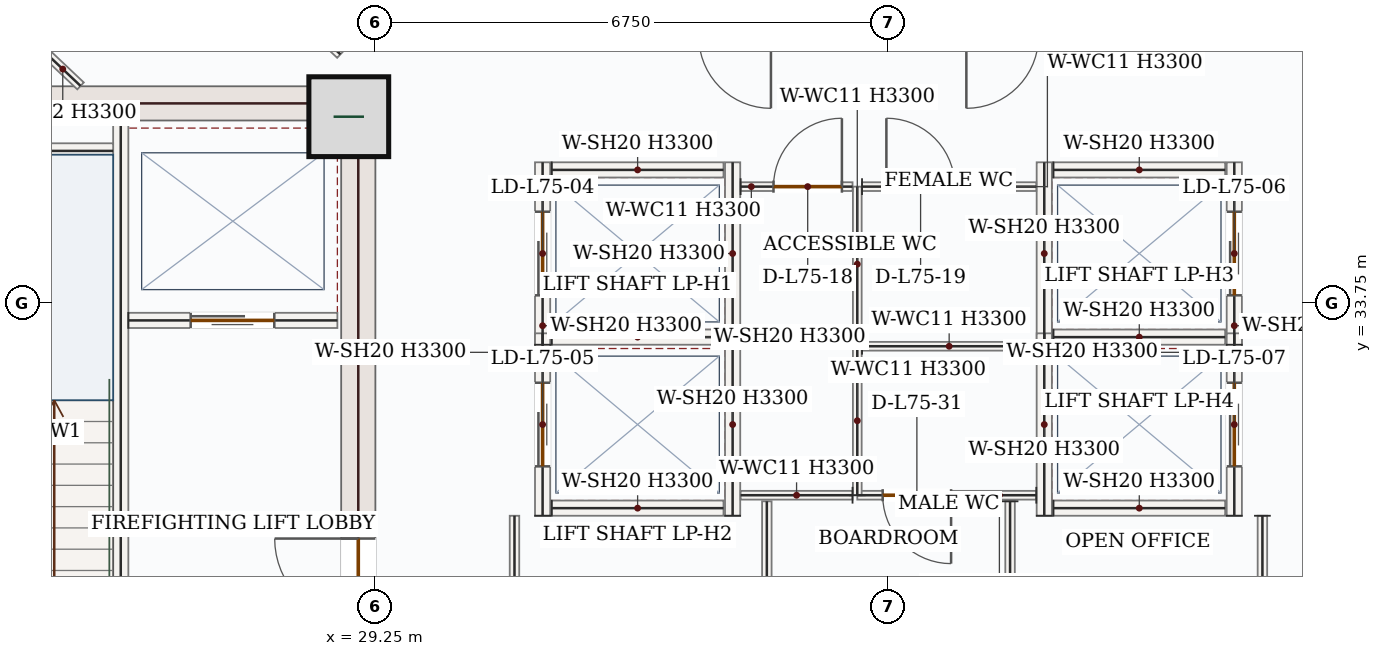
"""IFC4 building model, lengths in metres.
Left out: names, types, materials, properties, quantities, classifications, styles, units other than length and angle.
Written with IfcOpenShell. Run it as: python <this file> out.ifc"""

import sys

from ifc_helpers import new_model, si_unit, direction, frame, frame_2d, origin, origin_2d, place, context, subcontext, project, spatial, rectangle, extrude, source, transform, mapped, element, fill, save


model = new_model("IFC4")
c1 = context("Model", 3, precision=1e-05, world=origin(), true_north=direction((0.0, 1.0)))
c2 = subcontext(c1, "Body", "Model", "MODEL_VIEW")
j1 = project(units=[si_unit("LENGTHUNIT", "METRE"), si_unit("PLANEANGLEUNIT", "RADIAN")], contexts=[c1])
p1 = place(None, origin())
s1 = spatial("IfcSite", under=j1, at=p1, CompositionType="ELEMENT")
p2 = place(p1, origin())
s2 = spatial("IfcBuilding", under=s1, at=p2, CompositionType="ELEMENT")
p3 = place(p2, frame((0.0, 0.0, 310.35)))
s3 = spatial("IfcBuildingStorey", under=s2, at=p3, CompositionType="ELEMENT", Elevation=310.35)
p4 = place(p3, frame((29.025, 28.05, 0.0), z_axis=(0.0, 0.0, 1.0), x_axis=(0.0, 1.0, 0.0)))
e1 = element("IfcWall", 1, at=p4, inside=s3, PredefinedType="SHEAR", context=c2, shape_type="SweptSolid", body=[
    extrude(rectangle(XDim=8.55, YDim=0.45, at=frame_2d((4.275, 0.0))), origin(), (0.0, 0.0, 1.0), 3.3),
])
p5 = place(p4, frame((1.5, 0.0, 0.0)))
e2 = element("IfcOpeningElement", 2, at=p5, cuts=e1, PredefinedType="OPENING", context=c2, shape_type="SweptSolid", body=[
    extrude(rectangle(XDim=1.1, YDim=2.2, at=frame_2d((0.55, 1.1))), frame((0.0, 0.235, 0.0), z_axis=(0.0, -1.0, 0.0), x_axis=(1.0, 0.0, 0.0)), (0.0, 0.0, 1.0), 0.47),
])
m1 = source(origin(), c2, "Body", "SweptSolid", [
    extrude(rectangle(XDim=7.1, YDim=0.45, at=frame_2d((3.55, 0.0))), origin(), (0.0, 0.0, 1.0), 3.3),
])
p6 = place(p3, frame((21.7, 36.375, 0.0), z_axis=(0.0, 0.0, 1.0), x_axis=(1.0, 0.0, 0.0)))
e3 = element("IfcWall", 3, at=p6, inside=s3, PredefinedType="SHEAR", context=c2, shape_type="MappedRepresentation", body=[
    mapped(m1, transform((0.0, 0.0, 0.0), x_axis=(1.0, 0.0, 0.0), y_axis=(0.0, 1.0, 0.0), z_axis=(0.0, 0.0, 1.0), scale=1.0)),
])
m2 = source(origin(), c2, "Body", "SweptSolid", [
    extrude(rectangle(XDim=1.05, YDim=1.05, at=origin_2d()), origin(), (0.0, 0.0, 1.0), 3.75),
])
p7 = place(p3, frame((28.9, 36.2, 0.0), z_axis=(0.0, 0.0, 1.0), x_axis=(1.0, 0.0, 0.0)))
e4 = element("IfcColumn", 4, at=p7, inside=s3, PredefinedType="COLUMN", context=c2, shape_type="MappedRepresentation", body=[
    mapped(m2, transform((0.0, 0.0, 0.0), x_axis=(1.0, 0.0, 0.0), y_axis=(0.0, 1.0, 0.0), z_axis=(0.0, 0.0, 1.0), scale=1.0)),
])
m3 = source(origin(), c2, "Body", "SweptSolid", [
    extrude(rectangle(XDim=10.47, YDim=0.28, at=frame_2d((5.235, 0.0))), origin(), (0.0, 0.0, 1.0), 3.3),
])
p8 = place(p3, frame((18.94, 35.542, 0.0), z_axis=(0.0, 0.0, 1.0), x_axis=(0.690070788875, 0.723741878256, 0.0)))
e5 = element("IfcWall", 5, at=p8, inside=s3, PredefinedType="SOLIDWALL", context=c2, shape_type="MappedRepresentation", body=[
    mapped(m3, transform((0.0, 0.0, 0.0), x_axis=(1.0, 0.0, 0.0), y_axis=(0.0, 1.0, 0.0), z_axis=(0.0, 0.0, 1.0), scale=1.0)),
])
p9 = place(p3, frame((25.9, 28.15, 0.0), z_axis=(0.0, 0.0, 1.0), x_axis=(0.0, 1.0, 0.0)))
e6 = element("IfcWall", 6, at=p9, inside=s3, PredefinedType="SOLIDWALL", context=c2, shape_type="SweptSolid", body=[
    extrude(rectangle(XDim=8.0, YDim=0.2, at=frame_2d((4.0, 0.0))), origin(), (0.0, 0.0, 1.0), 3.3),
])
p10 = place(p9, frame((0.4, 0.0, 0.0)))
e7 = element("IfcOpeningElement", 7, at=p10, cuts=e6, PredefinedType="OPENING", context=c2, shape_type="SweptSolid", body=[
    extrude(rectangle(XDim=1.05, YDim=2.15, at=frame_2d((0.525, 1.075))), frame((0.0, 0.11, 0.0), z_axis=(0.0, -1.0, 0.0), x_axis=(1.0, 0.0, 0.0)), (0.0, 0.0, 1.0), 0.22),
])
m4 = source(origin(), c2, "Body", "SweptSolid", [
    extrude(rectangle(XDim=3.25, YDim=0.2, at=frame_2d((1.625, 0.0))), origin(), (0.0, 0.0, 1.0), 3.3),
])
p11 = place(p3, frame((22.55, 35.75, 0.0), z_axis=(0.0, 0.0, 1.0), x_axis=(1.0, 0.0, 0.0)))
e8 = element("IfcWall", 8, at=p11, inside=s3, PredefinedType="SOLIDWALL", context=c2, shape_type="MappedRepresentation", body=[
    mapped(m4, transform((0.0, 0.0, 0.0), x_axis=(1.0, 0.0, 0.0), y_axis=(0.0, 1.0, 0.0), z_axis=(0.0, 0.0, 1.0), scale=1.0)),
])
p12 = place(p3, frame((26.0, 33.52, 0.0), z_axis=(0.0, 0.0, 1.0), x_axis=(1.0, 0.0, 0.0)))
e9 = element("IfcWall", 9, at=p12, inside=s3, PredefinedType="SOLIDWALL", context=c2, shape_type="SweptSolid", body=[
    extrude(rectangle(XDim=2.75, YDim=0.2, at=frame_2d((1.375, 0.0))), origin(), (0.0, 0.0, 1.0), 3.3),
])
p13 = place(p12, frame((0.82, 0.0, 0.0)))
e10 = element("IfcOpeningElement", 10, at=p13, cuts=e9, PredefinedType="OPENING", context=c2, shape_type="SweptSolid", body=[
    extrude(rectangle(XDim=1.1, YDim=2.15, at=frame_2d((0.55, 1.075))), frame((0.0, 0.11, 0.0), z_axis=(0.0, -1.0, 0.0), x_axis=(1.0, 0.0, 0.0)), (0.0, 0.0, 1.0), 0.22),
])
p14 = place(p3, frame((31.45, 33.2, 0.0), z_axis=(0.0, 0.0, 1.0), x_axis=(0.0, 1.0, 0.0)))
e11 = element("IfcWall", 11, at=p14, inside=s3, PredefinedType="SOLIDWALL", context=c2, shape_type="SweptSolid", body=[
    extrude(rectangle(XDim=2.4, YDim=0.2, at=frame_2d((1.2, 0.0))), origin(), (0.0, 0.0, 1.0), 3.3),
])
p15 = place(p14, frame((0.65, 0.0, 0.0)))
e12 = element("IfcOpeningElement", 12, at=p15, cuts=e11, PredefinedType="OPENING", context=c2, shape_type="SweptSolid", body=[
    extrude(rectangle(XDim=1.1, YDim=2.15, at=frame_2d((0.55, 1.075))), frame((0.0, 0.11, 0.0), z_axis=(0.0, -1.0, 0.0), x_axis=(1.0, 0.0, 0.0)), (0.0, 0.0, 1.0), 0.22),
])
m5 = source(origin(), c2, "Body", "SweptSolid", [
    extrude(rectangle(XDim=2.4, YDim=0.2, at=frame_2d((1.2, 0.0))), origin(), (0.0, 0.0, 1.0), 3.3),
])
p16 = place(p3, frame((33.95, 33.2, 0.0), z_axis=(0.0, 0.0, 1.0), x_axis=(0.0, 1.0, 0.0)))
e13 = element("IfcWall", 13, at=p16, inside=s3, PredefinedType="SOLIDWALL", context=c2, shape_type="MappedRepresentation", body=[
    mapped(m5, transform((0.0, 0.0, 0.0), x_axis=(1.0, 0.0, 0.0), y_axis=(0.0, 1.0, 0.0), z_axis=(0.0, 0.0, 1.0), scale=1.0)),
])
m6 = source(origin(), c2, "Body", "SweptSolid", [
    extrude(rectangle(XDim=2.26, YDim=0.2, at=frame_2d((1.13, 0.0))), origin(), (0.0, 0.0, 1.0), 3.3),
])
for number, where, z_axis, x_axis in (
    (14, (31.57, 33.3, 0.0), (0.0, 0.0, 1.0), (1.0, 0.0, 0.0)),
    (15, (31.57, 35.5, 0.0), (0.0, 0.0, 1.0), (1.0, 0.0, 0.0)),
):
    element("IfcWall", number, at=place(p3, frame(where, z_axis=z_axis, x_axis=x_axis)), inside=s3, PredefinedType="SOLIDWALL", context=c2, shape_type="MappedRepresentation", body=[
        mapped(m6, transform((0.0, 0.0, 0.0), x_axis=(1.0, 0.0, 0.0), y_axis=(0.0, 1.0, 0.0), z_axis=(0.0, 0.0, 1.0), scale=1.0)),
    ])
p17 = place(p3, frame((31.45, 30.95, 0.0), z_axis=(0.0, 0.0, 1.0), x_axis=(0.0, 1.0, 0.0)))
e16 = element("IfcWall", 16, at=p17, inside=s3, PredefinedType="SOLIDWALL", context=c2, shape_type="SweptSolid", body=[
    extrude(rectangle(XDim=2.4, YDim=0.2, at=frame_2d((1.2, 0.0))), origin(), (0.0, 0.0, 1.0), 3.3),
])
p18 = place(p17, frame((0.65, 0.0, 0.0)))
e17 = element("IfcOpeningElement", 17, at=p18, cuts=e16, PredefinedType="OPENING", context=c2, shape_type="SweptSolid", body=[
    extrude(rectangle(XDim=1.1, YDim=2.15, at=frame_2d((0.55, 1.075))), frame((0.0, 0.11, 0.0), z_axis=(0.0, -1.0, 0.0), x_axis=(1.0, 0.0, 0.0)), (0.0, 0.0, 1.0), 0.22),
])
p19 = place(p3, frame((33.95, 30.95, 0.0), z_axis=(0.0, 0.0, 1.0), x_axis=(0.0, 1.0, 0.0)))
e18 = element("IfcWall", 18, at=p19, inside=s3, PredefinedType="SOLIDWALL", context=c2, shape_type="MappedRepresentation", body=[
    mapped(m5, transform((0.0, 0.0, 0.0), x_axis=(1.0, 0.0, 0.0), y_axis=(0.0, 1.0, 0.0), z_axis=(0.0, 0.0, 1.0), scale=1.0)),
])
p20 = place(p3, frame((31.57, 31.05, 0.0), z_axis=(0.0, 0.0, 1.0), x_axis=(1.0, 0.0, 0.0)))
e19 = element("IfcWall", 19, at=p20, inside=s3, PredefinedType="SOLIDWALL", context=c2, shape_type="MappedRepresentation", body=[
    mapped(m6, transform((0.0, 0.0, 0.0), x_axis=(1.0, 0.0, 0.0), y_axis=(0.0, 1.0, 0.0), z_axis=(0.0, 0.0, 1.0), scale=1.0)),
])
p21 = place(p3, frame((38.05, 33.2, 0.0), z_axis=(0.0, 0.0, 1.0), x_axis=(0.0, 1.0, 0.0)))
e20 = element("IfcWall", 20, at=p21, inside=s3, PredefinedType="SOLIDWALL", context=c2, shape_type="MappedRepresentation", body=[
    mapped(m5, transform((0.0, 0.0, 0.0), x_axis=(1.0, 0.0, 0.0), y_axis=(0.0, 1.0, 0.0), z_axis=(0.0, 0.0, 1.0), scale=1.0)),
])
p22 = place(p3, frame((40.55, 33.2, 0.0), z_axis=(0.0, 0.0, 1.0), x_axis=(0.0, 1.0, 0.0)))
e21 = element("IfcWall", 21, at=p22, inside=s3, PredefinedType="SOLIDWALL", context=c2, shape_type="SweptSolid", body=[
    extrude(rectangle(XDim=2.4, YDim=0.2, at=frame_2d((1.2, 0.0))), origin(), (0.0, 0.0, 1.0), 3.3),
])
p23 = place(p22, frame((0.65, 0.0, 0.0)))
e22 = element("IfcOpeningElement", 22, at=p23, cuts=e21, PredefinedType="OPENING", context=c2, shape_type="SweptSolid", body=[
    extrude(rectangle(XDim=1.1, YDim=2.15, at=frame_2d((0.55, 1.075))), frame((0.0, 0.11, 0.0), z_axis=(0.0, -1.0, 0.0), x_axis=(1.0, 0.0, 0.0)), (0.0, 0.0, 1.0), 0.22),
])
for number, where, z_axis, x_axis in (
    (23, (38.17, 33.3, 0.0), (0.0, 0.0, 1.0), (1.0, 0.0, 0.0)),
    (24, (38.17, 35.5, 0.0), (0.0, 0.0, 1.0), (1.0, 0.0, 0.0)),
):
    element("IfcWall", number, at=place(p3, frame(where, z_axis=z_axis, x_axis=x_axis)), inside=s3, PredefinedType="SOLIDWALL", context=c2, shape_type="MappedRepresentation", body=[
        mapped(m6, transform((0.0, 0.0, 0.0), x_axis=(1.0, 0.0, 0.0), y_axis=(0.0, 1.0, 0.0), z_axis=(0.0, 0.0, 1.0), scale=1.0)),
    ])
p24 = place(p3, frame((38.05, 30.95, 0.0), z_axis=(0.0, 0.0, 1.0), x_axis=(0.0, 1.0, 0.0)))
e25 = element("IfcWall", 25, at=p24, inside=s3, PredefinedType="SOLIDWALL", context=c2, shape_type="MappedRepresentation", body=[
    mapped(m5, transform((0.0, 0.0, 0.0), x_axis=(1.0, 0.0, 0.0), y_axis=(0.0, 1.0, 0.0), z_axis=(0.0, 0.0, 1.0), scale=1.0)),
])
p25 = place(p3, frame((40.55, 30.95, 0.0), z_axis=(0.0, 0.0, 1.0), x_axis=(0.0, 1.0, 0.0)))
e26 = element("IfcWall", 26, at=p25, inside=s3, PredefinedType="SOLIDWALL", context=c2, shape_type="SweptSolid", body=[
    extrude(rectangle(XDim=2.4, YDim=0.2, at=frame_2d((1.2, 0.0))), origin(), (0.0, 0.0, 1.0), 3.3),
])
p26 = place(p25, frame((0.65, 0.0, 0.0)))
e27 = element("IfcOpeningElement", 27, at=p26, cuts=e26, PredefinedType="OPENING", context=c2, shape_type="SweptSolid", body=[
    extrude(rectangle(XDim=1.1, YDim=2.15, at=frame_2d((0.55, 1.075))), frame((0.0, 0.11, 0.0), z_axis=(0.0, -1.0, 0.0), x_axis=(1.0, 0.0, 0.0)), (0.0, 0.0, 1.0), 0.22),
])
p27 = place(p3, frame((38.17, 31.05, 0.0), z_axis=(0.0, 0.0, 1.0), x_axis=(1.0, 0.0, 0.0)))
e28 = element("IfcWall", 28, at=p27, inside=s3, PredefinedType="SOLIDWALL", context=c2, shape_type="MappedRepresentation", body=[
    mapped(m6, transform((0.0, 0.0, 0.0), x_axis=(1.0, 0.0, 0.0), y_axis=(0.0, 1.0, 0.0), z_axis=(0.0, 0.0, 1.0), scale=1.0)),
])
p28 = place(p3, frame((37.945, 31.22, 0.0), z_axis=(0.0, 0.0, 1.0), x_axis=(-1.0, 0.0, 0.0)))
e29 = element("IfcWall", 29, at=p28, inside=s3, PredefinedType="PARTITIONING", context=c2, shape_type="SweptSolid", body=[
    extrude(rectangle(XDim=2.355, YDim=0.115, at=frame_2d((1.177, 0.0))), origin(), (0.0, 0.0, 1.0), 3.3),
])
p29 = place(p28, frame((1.121, 0.0, 0.0)))
e30 = element("IfcOpeningElement", 30, at=p29, cuts=e29, PredefinedType="OPENING", context=c2, shape_type="SweptSolid", body=[
    extrude(rectangle(XDim=0.9, YDim=2.1, at=frame_2d((0.45, 1.05))), frame((0.0, 0.067, 0.0), z_axis=(0.0, -1.0, 0.0), x_axis=(1.0, 0.0, 0.0)), (0.0, 0.0, 1.0), 0.135),
])
m7 = source(origin(), c2, "Body", "SweptSolid", [
    extrude(rectangle(XDim=1.96, YDim=0.115, at=frame_2d((0.98, 0.0))), origin(), (0.0, 0.0, 1.0), 3.3),
])
p30 = place(p3, frame((35.59, 31.22, 0.0), z_axis=(0.0, 0.0, 1.0), x_axis=(0.0, 1.0, 0.0)))
e31 = element("IfcWall", 31, at=p30, inside=s3, PredefinedType="PARTITIONING", context=c2, shape_type="MappedRepresentation", body=[
    mapped(m7, transform((0.0, 0.0, 0.0), x_axis=(1.0, 0.0, 0.0), y_axis=(0.0, 1.0, 0.0), z_axis=(0.0, 0.0, 1.0), scale=1.0)),
])
m8 = source(origin(), c2, "Body", "SweptSolid", [
    extrude(rectangle(XDim=2.292, YDim=0.115, at=frame_2d((1.146, 0.0))), origin(), (0.0, 0.0, 1.0), 3.3),
])
p31 = place(p3, frame((35.653, 33.18, 0.0), z_axis=(0.0, 0.0, 1.0), x_axis=(1.0, 0.0, 0.0)))
e32 = element("IfcWall", 32, at=p31, inside=s3, PredefinedType="PARTITIONING", context=c2, shape_type="MappedRepresentation", body=[
    mapped(m8, transform((0.0, 0.0, 0.0), x_axis=(1.0, 0.0, 0.0), y_axis=(0.0, 1.0, 0.0), z_axis=(0.0, 0.0, 1.0), scale=1.0)),
])
m9 = source(origin(), c2, "Body", "SweptSolid", [
    extrude(rectangle(XDim=2.04, YDim=0.115, at=frame_2d((1.02, 0.0))), origin(), (0.0, 0.0, 1.0), 3.3),
])
p32 = place(p3, frame((35.59, 33.24, 0.0), z_axis=(0.0, 0.0, 1.0), x_axis=(0.0, 1.0, 0.0)))
e33 = element("IfcWall", 33, at=p32, inside=s3, PredefinedType="PARTITIONING", context=c2, shape_type="MappedRepresentation", body=[
    mapped(m9, transform((0.0, 0.0, 0.0), x_axis=(1.0, 0.0, 0.0), y_axis=(0.0, 1.0, 0.0), z_axis=(0.0, 0.0, 1.0), scale=1.0)),
])
p33 = place(p3, frame((35.653, 35.28, 0.0), z_axis=(0.0, 0.0, 1.0), x_axis=(1.0, 0.0, 0.0)))
e34 = element("IfcWall", 34, at=p33, inside=s3, PredefinedType="PARTITIONING", context=c2, shape_type="SweptSolid", body=[
    extrude(rectangle(XDim=2.292, YDim=0.115, at=frame_2d((1.146, 0.0))), origin(), (0.0, 0.0, 1.0), 3.3),
])
p34 = place(p33, frame((0.32, 0.0, 0.0)))
e35 = element("IfcOpeningElement", 35, at=p34, cuts=e34, PredefinedType="OPENING", context=c2, shape_type="SweptSolid", body=[
    extrude(rectangle(XDim=0.9, YDim=2.1, at=frame_2d((0.45, 1.05))), frame((0.0, 0.067, 0.0), z_axis=(0.0, -1.0, 0.0), x_axis=(1.0, 0.0, 0.0)), (0.0, 0.0, 1.0), 0.135),
])
m10 = source(origin(), c2, "Body", "SweptSolid", [
    extrude(rectangle(XDim=1.473, YDim=0.115, at=frame_2d((0.736, 0.0))), origin(), (0.0, 0.0, 1.0), 3.3),
])
p35 = place(p3, frame((35.528, 31.22, 0.0), z_axis=(0.0, 0.0, 1.0), x_axis=(-1.0, 0.0, 0.0)))
e36 = element("IfcWall", 36, at=p35, inside=s3, PredefinedType="PARTITIONING", context=c2, shape_type="MappedRepresentation", body=[
    mapped(m10, transform((0.0, 0.0, 0.0), x_axis=(1.0, 0.0, 0.0), y_axis=(0.0, 1.0, 0.0), z_axis=(0.0, 0.0, 1.0), scale=1.0)),
])
p36 = place(p3, frame((34.055, 35.28, 0.0), z_axis=(0.0, 0.0, 1.0), x_axis=(1.0, 0.0, 0.0)))
e37 = element("IfcWall", 37, at=p36, inside=s3, PredefinedType="PARTITIONING", context=c2, shape_type="SweptSolid", body=[
    extrude(rectangle(XDim=1.473, YDim=0.115, at=frame_2d((0.736, 0.0))), origin(), (0.0, 0.0, 1.0), 3.3),
])
p37 = place(p36, frame((0.433, 0.0, 0.0)))
e38 = element("IfcOpeningElement", 38, at=p37, cuts=e37, PredefinedType="OPENING", context=c2, shape_type="SweptSolid", body=[
    extrude(rectangle(XDim=0.9, YDim=2.1, at=frame_2d((0.45, 1.05))), frame((0.0, 0.067, 0.0), z_axis=(0.0, -1.0, 0.0), x_axis=(1.0, 0.0, 0.0)), (0.0, 0.0, 1.0), 0.135),
])
p38 = place(p3, frame((23.651, 38.231, 0.0), z_axis=(0.0, 0.0, 1.0), x_axis=(0.726735597886, -0.686917295433, 0.0)))
e39 = element("IfcWall", 39, at=p38, inside=s3, PredefinedType="PARTITIONING", context=c2, shape_type="SweptSolid", body=[
    extrude(rectangle(XDim=2.367, YDim=0.125, at=frame_2d((1.183, 0.0))), origin(), (0.0, 0.0, 1.0), 3.3),
])
p39 = place(p38, frame((0.692, 0.0, 0.0)))
e40 = element("IfcOpeningElement", 40, at=p39, cuts=e39, PredefinedType="OPENING", context=c2, shape_type="SweptSolid", body=[
    extrude(rectangle(XDim=0.88, YDim=2.1, at=frame_2d((0.44, 1.05))), frame((0.0, 0.073, 0.0), z_axis=(0.0, -1.0, 0.0), x_axis=(1.0, 0.0, 0.0)), (0.0, 0.0, 1.0), 0.145),
])
m11 = source(origin(), c2, "Body", "SweptSolid", [
    extrude(rectangle(XDim=3.2, YDim=0.125, at=frame_2d((1.6, 0.0))), origin(), (0.0, 0.0, 1.0), 3.3),
])
for number, where, z_axis, x_axis in (
    (41, (34.4, 27.94, 0.0), (0.0, 0.0, 1.0), (0.0, 1.0, 0.0)),
    (42, (37.6, 31.14, 0.0), (0.0, 0.0, 1.0), (0.0, -1.0, 0.0)),
):
    element("IfcWall", number, at=place(p3, frame(where, z_axis=z_axis, x_axis=x_axis)), inside=s3, PredefinedType="PARTITIONING", context=c2, shape_type="MappedRepresentation", body=[
        mapped(m11, transform((0.0, 0.0, 0.0), x_axis=(1.0, 0.0, 0.0), y_axis=(0.0, 1.0, 0.0), z_axis=(0.0, 0.0, 1.0), scale=1.0)),
    ])
m12 = source(origin(), c2, "Body", "SweptSolid", [
    extrude(rectangle(XDim=2.942, YDim=0.125, at=frame_2d((1.471, 0.0))), origin(), (0.0, 0.0, 1.0), 3.3),
])
p40 = place(p3, frame((31.08, 28.008, 0.0), z_axis=(0.0, 0.0, 1.0), x_axis=(0.0, 1.0, 0.0)))
e43 = element("IfcWall", 43, at=p40, inside=s3, PredefinedType="PARTITIONING", context=c2, shape_type="MappedRepresentation", body=[
    mapped(m12, transform((0.0, 0.0, 0.0), x_axis=(1.0, 0.0, 0.0), y_axis=(0.0, 1.0, 0.0), z_axis=(0.0, 0.0, 1.0), scale=1.0)),
])
m13 = source(origin(), c2, "Body", "SweptSolid", [
    extrude(rectangle(XDim=3.01, YDim=0.125, at=frame_2d((1.505, 0.0))), origin(), (0.0, 0.0, 1.0), 3.3),
])
p41 = place(p3, frame((40.92, 30.95, 0.0), z_axis=(0.0, 0.0, 1.0), x_axis=(0.0, -1.0, 0.0)))
e44 = element("IfcWall", 44, at=p41, inside=s3, PredefinedType="PARTITIONING", context=c2, shape_type="MappedRepresentation", body=[
    mapped(m13, transform((0.0, 0.0, 0.0), x_axis=(1.0, 0.0, 0.0), y_axis=(0.0, 1.0, 0.0), z_axis=(0.0, 0.0, 1.0), scale=1.0)),
])
p42 = place(p3, frame((24.456, 41.117, 0.0), z_axis=(0.0, 0.0, 1.0), x_axis=(0.726761082497, -0.686890332562, 0.0)))
e45 = element("IfcWall", 45, at=p42, inside=s3, PredefinedType="PARTITIONING", context=c2, shape_type="SweptSolid", body=[
    extrude(rectangle(XDim=5.964, YDim=0.125, at=frame_2d((2.982, 0.0))), origin(), (0.0, 0.0, 1.0), 3.3),
])
p43 = place(p42, frame((1.103, 0.0, 0.0)))
e46 = element("IfcOpeningElement", 46, at=p43, cuts=e45, PredefinedType="OPENING", context=c2, shape_type="SweptSolid", body=[
    extrude(rectangle(XDim=0.95, YDim=2.15, at=frame_2d((0.475, 1.075))), frame((0.0, 0.073, 0.0), z_axis=(0.0, -1.0, 0.0), x_axis=(1.0, 0.0, 0.0)), (0.0, 0.0, 1.0), 0.145),
])
m14 = source(origin(), c2, "Body", "SweptSolid", [
    extrude(rectangle(XDim=1.1, YDim=2.15, at=frame_2d((0.55, 1.075))), frame((0.0, 0.025, 0.0), z_axis=(0.0, -1.0, 0.0), x_axis=(1.0, 0.0, 0.0)), (0.0, 0.0, 1.0), 0.05),
])
p44 = place(p13, origin())
e47 = element("IfcDoor", 47, at=p44, inside=s3, OperationType="DOUBLE_DOOR_SLIDING", PredefinedType="DOOR", context=c2, shape_type="MappedRepresentation", body=[
    mapped(m14, transform((0.0, 0.0, 0.0), x_axis=(1.0, 0.0, 0.0), y_axis=(0.0, 1.0, 0.0), z_axis=(0.0, 0.0, 1.0), scale=1.0)),
])
fill(e10, e47)
m15 = source(origin(), c2, "Body", "SweptSolid", [
    extrude(rectangle(XDim=1.1, YDim=2.2, at=frame_2d((0.55, 1.1))), frame((0.0, 0.025, 0.0), z_axis=(0.0, -1.0, 0.0), x_axis=(1.0, 0.0, 0.0)), (0.0, 0.0, 1.0), 0.05),
])
p45 = place(p5, origin())
e48 = element("IfcDoor", 48, at=p45, inside=s3, OperationType="SINGLE_SWING_RIGHT", PredefinedType="DOOR", context=c2, shape_type="MappedRepresentation", body=[
    mapped(m15, transform((0.0, 0.0, 0.0), x_axis=(1.0, 0.0, 0.0), y_axis=(0.0, 1.0, 0.0), z_axis=(0.0, 0.0, 1.0), scale=1.0)),
])
fill(e2, e48)
p46 = place(p15, origin())
e49 = element("IfcDoor", 49, at=p46, inside=s3, OperationType="DOUBLE_DOOR_SLIDING", PredefinedType="DOOR", context=c2, shape_type="MappedRepresentation", body=[
    mapped(m14, transform((0.0, 0.0, 0.0), x_axis=(1.0, 0.0, 0.0), y_axis=(0.0, 1.0, 0.0), z_axis=(0.0, 0.0, 1.0), scale=1.0)),
])
fill(e12, e49)
p47 = place(p18, origin())
e50 = element("IfcDoor", 50, at=p47, inside=s3, OperationType="DOUBLE_DOOR_SLIDING", PredefinedType="DOOR", context=c2, shape_type="MappedRepresentation", body=[
    mapped(m14, transform((0.0, 0.0, 0.0), x_axis=(1.0, 0.0, 0.0), y_axis=(0.0, 1.0, 0.0), z_axis=(0.0, 0.0, 1.0), scale=1.0)),
])
fill(e17, e50)
p48 = place(p23, origin())
e51 = element("IfcDoor", 51, at=p48, inside=s3, OperationType="DOUBLE_DOOR_SLIDING", PredefinedType="DOOR", context=c2, shape_type="MappedRepresentation", body=[
    mapped(m14, transform((0.0, 0.0, 0.0), x_axis=(1.0, 0.0, 0.0), y_axis=(0.0, 1.0, 0.0), z_axis=(0.0, 0.0, 1.0), scale=1.0)),
])
fill(e22, e51)
p49 = place(p26, origin())
e52 = element("IfcDoor", 52, at=p49, inside=s3, OperationType="DOUBLE_DOOR_SLIDING", PredefinedType="DOOR", context=c2, shape_type="MappedRepresentation", body=[
    mapped(m14, transform((0.0, 0.0, 0.0), x_axis=(1.0, 0.0, 0.0), y_axis=(0.0, 1.0, 0.0), z_axis=(0.0, 0.0, 1.0), scale=1.0)),
])
fill(e27, e52)
m16 = source(origin(), c2, "Body", "SweptSolid", [
    extrude(rectangle(XDim=0.9, YDim=2.1, at=frame_2d((0.45, 1.05))), frame((0.0, 0.025, 0.0), z_axis=(0.0, -1.0, 0.0), x_axis=(1.0, 0.0, 0.0)), (0.0, 0.0, 1.0), 0.05),
])
p50 = place(p37, origin())
e53 = element("IfcDoor", 53, at=p50, inside=s3, OperationType="SINGLE_SWING_RIGHT", PredefinedType="DOOR", context=c2, shape_type="MappedRepresentation", body=[
    mapped(m16, transform((0.0, 0.0, 0.0), x_axis=(1.0, 0.0, 0.0), y_axis=(0.0, 1.0, 0.0), z_axis=(0.0, 0.0, 1.0), scale=1.0)),
])
fill(e38, e53)
p51 = place(p34, origin())
e54 = element("IfcDoor", 54, at=p51, inside=s3, OperationType="SINGLE_SWING_LEFT", PredefinedType="DOOR", context=c2, shape_type="MappedRepresentation", body=[
    mapped(m16, transform((0.0, 0.0, 0.0), x_axis=(1.0, 0.0, 0.0), y_axis=(0.0, 1.0, 0.0), z_axis=(0.0, 0.0, 1.0), scale=1.0)),
])
fill(e35, e54)
p52 = place(p29, origin())
e55 = element("IfcDoor", 55, at=p52, inside=s3, OperationType="SINGLE_SWING_LEFT", PredefinedType="DOOR", context=c2, shape_type="MappedRepresentation", body=[
    mapped(m16, transform((0.0, 0.0, 0.0), x_axis=(1.0, 0.0, 0.0), y_axis=(0.0, 1.0, 0.0), z_axis=(0.0, 0.0, 1.0), scale=1.0)),
])
fill(e30, e55)
save(model, sys.argv[1])
